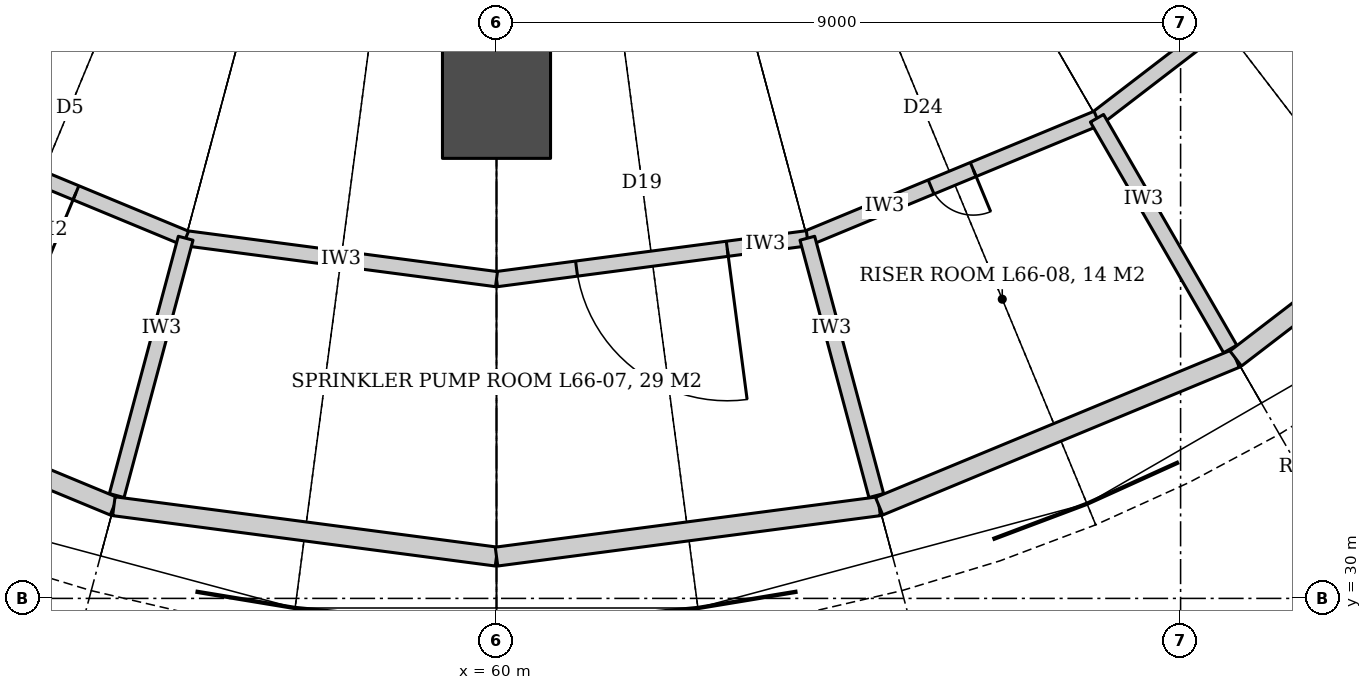
"""IFC4 building model, lengths in metres.
Left out: names, types, materials, properties, quantities, classifications, styles, units other than length and angle.
Written with IfcOpenShell. Run it as: python <this file> out.ifc"""

import sys

from ifc_helpers import new_model, si_unit, direction, frame, frame_2d, origin, origin_2d, place, context, subcontext, project, spatial, polyline, rectangle, hollow_circle, outline, extrude, element, fill, save


model = new_model("IFC4")
c1 = context("Model", 3, precision=1e-05, world=origin(), true_north=direction((0.0, 1.0)))
c2 = subcontext(c1, "Body", "Model", "MODEL_VIEW")
j1 = project(units=[si_unit("LENGTHUNIT", "METRE"), si_unit("PLANEANGLEUNIT", "RADIAN")], contexts=[c1])
p1 = place(None, origin())
s1 = spatial("IfcSite", under=j1, at=p1, CompositionType="ELEMENT")
p2 = place(p1, origin())
s2 = spatial("IfcBuilding", under=s1, at=p2, CompositionType="ELEMENT")
p3 = place(p2, frame((0.0, 0.0, 286.4)))
s3 = spatial("IfcBuildingStorey", under=s2, at=p3, CompositionType="ELEMENT", Elevation=286.4)
p4 = place(p3, frame((60.0, 36.5, -0.25), z_axis=(0.0, 0.0, 1.0), x_axis=(1.0, 0.0, 0.0)))
e1 = element("IfcColumn", 1, at=p4, inside=s3, PredefinedType="COLUMN", context=c2, shape_type="SweptSolid", body=[
    extrude(hollow_circle(Radius=0.711, WallThickness=0.07, at=origin_2d()), origin(), (0.0, 0.0, 1.0), 6.713),
])
p5 = place(p3, frame((71.172, 38.828, 0.0), z_axis=(0.0, 0.0, 1.0), x_axis=(-0.793389099494, -0.608714823874, 0.0)))
e2 = element("IfcWall", 2, at=p5, inside=s3, PredefinedType="PARTITIONING", context=c2, shape_type="SweptSolid", body=[
    extrude(rectangle(XDim=4.125, YDim=0.2, at=frame_2d((2.062, 0.0))), origin(), (0.0, 0.0, 1.0), 4.15),
])
p6 = place(p3, frame((67.9, 36.317, 0.0), z_axis=(0.0, 0.0, 1.0), x_axis=(-0.923859551549, -0.382731667114, 0.0)))
e3 = element("IfcWall", 3, at=p6, inside=s3, PredefinedType="PARTITIONING", context=c2, shape_type="SweptSolid", body=[
    extrude(rectangle(XDim=4.125, YDim=0.2, at=frame_2d((2.062, 0.0))), origin(), (0.0, 0.0, 1.0), 4.15),
])
p7 = place(p6, frame((1.762, 0.0, 0.0)))
e4 = element("IfcOpeningElement", 4, at=p7, cuts=e3, PredefinedType="OPENING", context=c2, shape_type="SweptSolid", body=[
    extrude(rectangle(XDim=0.6, YDim=2.0, at=frame_2d((0.3, 1.0))), frame((0.0, 0.11, 0.0), z_axis=(0.0, -1.0, 0.0), x_axis=(1.0, 0.0, 0.0)), (0.0, 0.0, 1.0), 0.22),
])
p8 = place(p3, frame((64.089, 34.738, 0.0), z_axis=(0.0, 0.0, 1.0), x_axis=(-0.991446234996, -0.130515758099, 0.0)))
e5 = element("IfcWall", 5, at=p8, inside=s3, PredefinedType="PARTITIONING", context=c2, shape_type="SweptSolid", body=[
    extrude(rectangle(XDim=4.125, YDim=0.2, at=frame_2d((2.062, 0.0))), origin(), (0.0, 0.0, 1.0), 4.15),
])
p9 = place(p8, frame((1.062, 0.0, 0.0)))
e6 = element("IfcOpeningElement", 6, at=p9, cuts=e5, PredefinedType="OPENING", context=c2, shape_type="SweptSolid", body=[
    extrude(rectangle(XDim=2.0, YDim=2.4, at=frame_2d((1.0, 1.2))), frame((0.0, 0.11, 0.0), z_axis=(0.0, -1.0, 0.0), x_axis=(1.0, 0.0, 0.0)), (0.0, 0.0, 1.0), 0.22),
])
p10 = place(p3, frame((60.0, 34.2, 0.0), z_axis=(0.0, 0.0, 1.0), x_axis=(-0.991446234996, 0.130515758099, 0.0)))
e7 = element("IfcWall", 7, at=p10, inside=s3, PredefinedType="PARTITIONING", context=c2, shape_type="SweptSolid", body=[
    extrude(rectangle(XDim=4.125, YDim=0.2, at=frame_2d((2.062, 0.0))), origin(), (0.0, 0.0, 1.0), 4.15),
])
p11 = place(p3, frame((55.911, 34.738, 0.0), z_axis=(0.0, 0.0, 1.0), x_axis=(-0.923859551549, 0.382731667114, 0.0)))
e8 = element("IfcWall", 8, at=p11, inside=s3, PredefinedType="PARTITIONING", context=c2, shape_type="SweptSolid", body=[
    extrude(rectangle(XDim=4.125, YDim=0.2, at=frame_2d((2.062, 0.0))), origin(), (0.0, 0.0, 1.0), 4.15),
])
p12 = place(p11, frame((1.562, 0.0, 0.0)))
e9 = element("IfcOpeningElement", 9, at=p12, cuts=e8, PredefinedType="OPENING", context=c2, shape_type="SweptSolid", body=[
    extrude(rectangle(XDim=1.0, YDim=2.1, at=frame_2d((0.5, 1.05))), frame((0.0, 0.11, 0.0), z_axis=(0.0, -1.0, 0.0), x_axis=(1.0, 0.0, 0.0)), (0.0, 0.0, 1.0), 0.22),
])
for number, where, z_axis, x_axis in (
    (10, (55.911, 34.738, 0.0), (0.0, 0.0, 1.0), (-0.259, -0.966, 0.0)),
    (11, (64.089, 34.738, 0.0), (0.0, 0.0, 1.0), (0.259, -0.966, 0.0)),
):
    element("IfcWall", number, at=place(p3, frame(where, z_axis=z_axis, x_axis=x_axis)), inside=s3, PredefinedType="PARTITIONING", context=c2, shape_type="SweptSolid", body=[
        extrude(rectangle(XDim=3.505, YDim=0.2, at=frame_2d((1.752, 0.0))), origin(), (0.0, 0.0, 1.0), 4.15),
    ])
p13 = place(p3, frame((67.9, 36.317, 0.0), z_axis=(0.0, 0.0, 1.0), x_axis=(0.500042005822, -0.866001150353, 0.0)))
e12 = element("IfcWall", 12, at=p13, inside=s3, PredefinedType="PARTITIONING", context=c2, shape_type="SweptSolid", body=[
    extrude(rectangle(XDim=3.505, YDim=0.2, at=frame_2d((1.752, 0.0))), origin(), (0.0, 0.0, 1.0), 4.15),
])
p14 = place(p3, frame((50.275, 33.156, 0.0), z_axis=(0.0, 0.0, 1.0), x_axis=(0.923881463636, -0.382678770184, 0.0)))
e13 = element("IfcWall", 13, at=p14, inside=s3, PredefinedType="SOLIDWALL", context=c2, shape_type="SweptSolid", body=[
    extrude(outline(polyline([(0.0, 0.0), (5.078, 0.0), (5.077, 5.692), (0.0, 6.323), (0.0, 0.0)])), frame((0.0, 0.125, 0.0), z_axis=(0.0, -1.0, 0.0), x_axis=(1.0, 0.0, 0.0)), (0.0, 0.0, 1.0), 0.25),
])
p15 = place(p3, frame((54.966, 31.213, 0.0), z_axis=(0.0, 0.0, 1.0), x_axis=(0.991448238941, -0.130500534482, 0.0)))
e14 = element("IfcWall", 14, at=p15, inside=s3, PredefinedType="SOLIDWALL", context=c2, shape_type="SweptSolid", body=[
    extrude(outline(polyline([(0.0, 0.0), (5.077, 0.0), (5.077, 5.476), (0.0, 5.692), (0.0, 0.0)])), frame((0.0, 0.125, 0.0), z_axis=(0.0, -1.0, 0.0), x_axis=(1.0, 0.0, 0.0)), (0.0, 0.0, 1.0), 0.25),
])
p16 = place(p3, frame((60.0, 30.55, 0.0), z_axis=(0.0, 0.0, 1.0), x_axis=(0.991448238941, 0.130500534482, 0.0)))
e15 = element("IfcWall", 15, at=p16, inside=s3, PredefinedType="SOLIDWALL", context=c2, shape_type="SweptSolid", body=[
    extrude(outline(polyline([(0.0, 0.0), (5.077, 0.0), (5.077, 5.692), (0.0, 5.476), (0.0, 0.0)])), frame((0.0, 0.125, 0.0), z_axis=(0.0, -1.0, 0.0), x_axis=(1.0, 0.0, 0.0)), (0.0, 0.0, 1.0), 0.25),
])
p17 = place(p3, frame((65.034, 31.213, 0.0), z_axis=(0.0, 0.0, 1.0), x_axis=(0.923881463636, 0.382678770184, 0.0)))
e16 = element("IfcWall", 16, at=p17, inside=s3, PredefinedType="SOLIDWALL", context=c2, shape_type="SweptSolid", body=[
    extrude(outline(polyline([(0.0, 0.0), (5.078, 0.0), (5.077, 6.323), (0.0, 5.692), (0.0, 0.0)])), frame((0.0, 0.125, 0.0), z_axis=(0.0, -1.0, 0.0), x_axis=(1.0, 0.0, 0.0)), (0.0, 0.0, 1.0), 0.25),
])
p18 = place(p3, frame((69.725, 33.156, 0.0), z_axis=(0.0, 0.0, 1.0), x_axis=(0.793333089115, 0.608787819946, 0.0)))
e17 = element("IfcWall", 17, at=p18, inside=s3, PredefinedType="SOLIDWALL", context=c2, shape_type="SweptSolid", body=[
    extrude(outline(polyline([(0.0, 0.0), (5.077, 0.0), (5.077, 7.327), (0.0, 6.323), (0.0, 0.0)])), frame((0.0, 0.125, 0.0), z_axis=(0.0, -1.0, 0.0), x_axis=(1.0, 0.0, 0.0)), (0.0, 0.0, 1.0), 0.25),
])
p19 = place(p12, origin())
e18 = element("IfcDoor", 18, at=p19, inside=s3, OperationType="SINGLE_SWING_LEFT", PredefinedType="DOOR", context=c2, shape_type="SweptSolid", body=[
    extrude(rectangle(XDim=1.0, YDim=2.1, at=frame_2d((0.5, 1.05))), frame((0.0, 0.025, 0.0), z_axis=(0.0, -1.0, 0.0), x_axis=(1.0, 0.0, 0.0)), (0.0, 0.0, 1.0), 0.05),
])
fill(e9, e18)
p20 = place(p9, origin())
e19 = element("IfcDoor", 19, at=p20, inside=s3, OperationType="DOUBLE_DOOR_DOUBLE_SWING", PredefinedType="DOOR", context=c2, shape_type="SweptSolid", body=[
    extrude(rectangle(XDim=2.0, YDim=2.4, at=frame_2d((1.0, 1.2))), frame((0.0, 0.025, 0.0), z_axis=(0.0, -1.0, 0.0), x_axis=(1.0, 0.0, 0.0)), (0.0, 0.0, 1.0), 0.05),
])
fill(e6, e19)
p21 = place(p7, origin())
e20 = element("IfcDoor", 20, at=p21, inside=s3, OperationType="SINGLE_SWING_LEFT", PredefinedType="DOOR", context=c2, shape_type="SweptSolid", body=[
    extrude(rectangle(XDim=0.6, YDim=2.0, at=frame_2d((0.3, 1.0))), frame((0.0, 0.025, 0.0), z_axis=(0.0, -1.0, 0.0), x_axis=(1.0, 0.0, 0.0)), (0.0, 0.0, 1.0), 0.05),
])
fill(e4, e20)
save(model, sys.argv[1])
